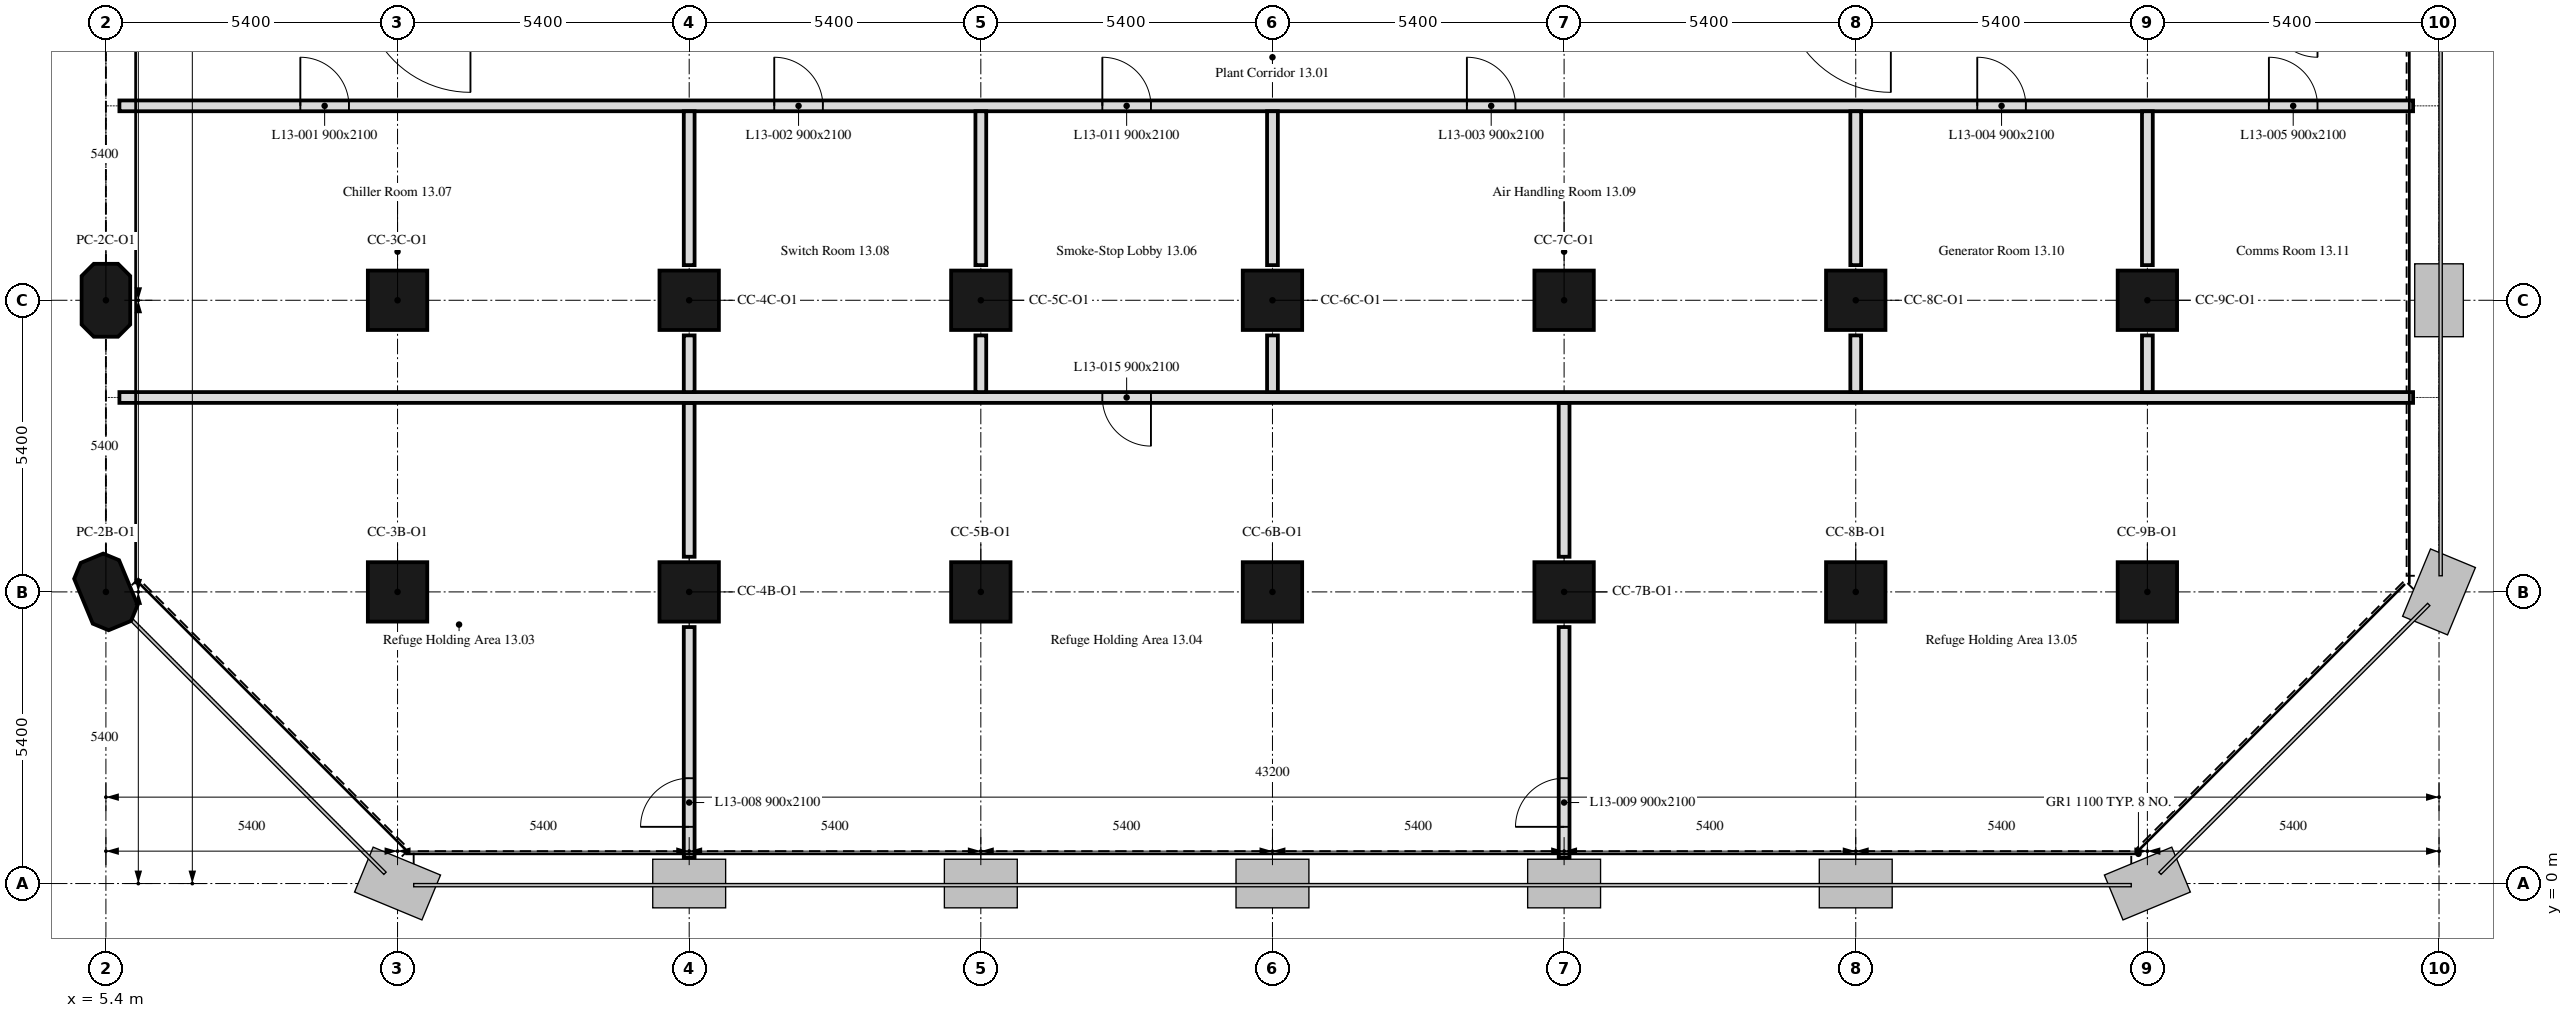
"""IFC4 building model, lengths in metres.
Left out: names, types, materials, properties, quantities, classifications, styles, units other than length and angle.
Written with IfcOpenShell. Run it as: python <this file> out.ifc"""

import sys

from ifc_helpers import new_model, si_unit, direction, frame, frame_2d, origin, origin_2d, place, context, subcontext, project, spatial, polyline, rectangle, outline, extrude, element, fill, save


model = new_model("IFC4")
c1 = context("Model", 3, precision=1e-05, world=origin(), true_north=direction((0.0, 1.0)))
c2 = subcontext(c1, "Body", "Model", "MODEL_VIEW")
j1 = project(units=[si_unit("LENGTHUNIT", "METRE"), si_unit("PLANEANGLEUNIT", "RADIAN")], contexts=[c1])
p1 = place(None, origin())
s1 = spatial("IfcSite", under=j1, at=p1, CompositionType="ELEMENT")
p2 = place(p1, origin())
s2 = spatial("IfcBuilding", under=s1, at=p2, CompositionType="ELEMENT")
p3 = place(p2, frame((0.0, 0.0, 60.2)))
s3 = spatial("IfcBuildingStorey", under=s2, at=p3, CompositionType="ELEMENT", Elevation=60.2)
p4 = place(p3, frame((5.4, 5.4, 0.0), z_axis=(0.0, 0.0, 1.0), x_axis=(-0.382683432365, 0.923879532511, 0.0)))
e1 = element("IfcColumn", 1, at=p4, inside=s3, PredefinedType="COLUMN", context=c2, shape_type="SweptSolid", body=[
    extrude(outline(polyline([(-0.45, -0.45), (0.45, -0.45), (0.675, -0.225), (0.675, 0.225), (0.45, 0.45), (-0.45, 0.45), (-0.675, 0.225), (-0.675, -0.225), (-0.45, -0.45)])), origin(), (0.0, 0.0, 1.0), 4.5),
])
for number, where, z_axis, x_axis in (
    (2, (10.8, 5.4, 0.0), (0.0, 0.0, 1.0), (1.0, 0.0, 0.0)),
    (3, (16.2, 5.4, 0.0), (0.0, 0.0, 1.0), (1.0, 0.0, 0.0)),
    (4, (21.6, 5.4, 0.0), (0.0, 0.0, 1.0), (1.0, 0.0, 0.0)),
    (5, (27.0, 5.4, 0.0), (0.0, 0.0, 1.0), (1.0, 0.0, 0.0)),
    (6, (32.4, 5.4, 0.0), (0.0, 0.0, 1.0), (1.0, 0.0, 0.0)),
    (7, (37.8, 5.4, 0.0), (0.0, 0.0, 1.0), (1.0, 0.0, 0.0)),
    (8, (43.2, 5.4, 0.0), (0.0, 0.0, 1.0), (1.0, 0.0, 0.0)),
):
    element("IfcColumn", number, at=place(p3, frame(where, z_axis=z_axis, x_axis=x_axis)), inside=s3, PredefinedType="COLUMN", context=c2, shape_type="SweptSolid", body=[
        extrude(rectangle(XDim=1.1, YDim=1.1, at=origin_2d()), origin(), (0.0, 0.0, 1.0), 4.5),
    ])
p5 = place(p3, frame((5.4, 10.8, 0.0), z_axis=(0.0, 0.0, 1.0), x_axis=(0.0, 1.0, 0.0)))
e9 = element("IfcColumn", 9, at=p5, inside=s3, PredefinedType="COLUMN", context=c2, shape_type="SweptSolid", body=[
    extrude(outline(polyline([(-0.45, -0.45), (0.45, -0.45), (0.675, -0.225), (0.675, 0.225), (0.45, 0.45), (-0.45, 0.45), (-0.675, 0.225), (-0.675, -0.225), (-0.45, -0.45)])), origin(), (0.0, 0.0, 1.0), 4.5),
])
for number, where, z_axis, x_axis in (
    (10, (10.8, 10.8, 0.0), (0.0, 0.0, 1.0), (1.0, 0.0, 0.0)),
    (11, (16.2, 10.8, 0.0), (0.0, 0.0, 1.0), (1.0, 0.0, 0.0)),
    (12, (21.6, 10.8, 0.0), (0.0, 0.0, 1.0), (1.0, 0.0, 0.0)),
    (13, (27.0, 10.8, 0.0), (0.0, 0.0, 1.0), (1.0, 0.0, 0.0)),
    (14, (32.4, 10.8, 0.0), (0.0, 0.0, 1.0), (1.0, 0.0, 0.0)),
    (15, (37.8, 10.8, 0.0), (0.0, 0.0, 1.0), (1.0, 0.0, 0.0)),
    (16, (43.2, 10.8, 0.0), (0.0, 0.0, 1.0), (1.0, 0.0, 0.0)),
):
    element("IfcColumn", number, at=place(p3, frame(where, z_axis=z_axis, x_axis=x_axis)), inside=s3, PredefinedType="COLUMN", context=c2, shape_type="SweptSolid", body=[
        extrude(rectangle(XDim=1.1, YDim=1.1, at=origin_2d()), origin(), (0.0, 0.0, 1.0), 4.5),
    ])
p6 = place(p3, frame((5.65, 14.4, 0.0), z_axis=(0.0, 0.0, 1.0), x_axis=(1.0, 0.0, 0.0)))
e17 = element("IfcWall", 17, at=p6, inside=s3, PredefinedType="PARTITIONING", context=c2, shape_type="SweptSolid", body=[
    extrude(rectangle(XDim=42.47, YDim=0.2, at=frame_2d((21.235, 0.0))), origin(), (0.0, 0.0, 1.0), 3.75),
])
p7 = place(p6, frame((3.35, 0.0, 0.0)))
e18 = element("IfcOpeningElement", 18, at=p7, cuts=e17, PredefinedType="OPENING", context=c2, shape_type="SweptSolid", body=[
    extrude(rectangle(XDim=0.9, YDim=2.1, at=frame_2d((0.45, 1.05))), frame((0.0, 0.1, 0.0), z_axis=(0.0, -1.0, 0.0), x_axis=(1.0, 0.0, 0.0)), (0.0, 0.0, 1.0), 0.2),
])
p8 = place(p6, frame((12.125, 0.0, 0.0)))
e19 = element("IfcOpeningElement", 19, at=p8, cuts=e17, PredefinedType="OPENING", context=c2, shape_type="SweptSolid", body=[
    extrude(rectangle(XDim=0.9, YDim=2.1, at=frame_2d((0.45, 1.05))), frame((0.0, 0.1, 0.0), z_axis=(0.0, -1.0, 0.0), x_axis=(1.0, 0.0, 0.0)), (0.0, 0.0, 1.0), 0.2),
])
p9 = place(p6, frame((24.95, 0.0, 0.0)))
e20 = element("IfcOpeningElement", 20, at=p9, cuts=e17, PredefinedType="OPENING", context=c2, shape_type="SweptSolid", body=[
    extrude(rectangle(XDim=0.9, YDim=2.1, at=frame_2d((0.45, 1.05))), frame((0.0, 0.1, 0.0), z_axis=(0.0, -1.0, 0.0), x_axis=(1.0, 0.0, 0.0)), (0.0, 0.0, 1.0), 0.2),
])
p10 = place(p6, frame((34.4, 0.0, 0.0)))
e21 = element("IfcOpeningElement", 21, at=p10, cuts=e17, PredefinedType="OPENING", context=c2, shape_type="SweptSolid", body=[
    extrude(rectangle(XDim=0.9, YDim=2.1, at=frame_2d((0.45, 1.05))), frame((0.0, 0.1, 0.0), z_axis=(0.0, -1.0, 0.0), x_axis=(1.0, 0.0, 0.0)), (0.0, 0.0, 1.0), 0.2),
])
p11 = place(p6, frame((39.8, 0.0, 0.0)))
e22 = element("IfcOpeningElement", 22, at=p11, cuts=e17, PredefinedType="OPENING", context=c2, shape_type="SweptSolid", body=[
    extrude(rectangle(XDim=0.9, YDim=2.1, at=frame_2d((0.45, 1.05))), frame((0.0, 0.1, 0.0), z_axis=(0.0, -1.0, 0.0), x_axis=(1.0, 0.0, 0.0)), (0.0, 0.0, 1.0), 0.2),
])
p12 = place(p6, frame((18.2, 0.0, 0.0)))
e23 = element("IfcOpeningElement", 23, at=p12, cuts=e17, PredefinedType="OPENING", context=c2, shape_type="SweptSolid", body=[
    extrude(rectangle(XDim=0.9, YDim=2.1, at=frame_2d((0.45, 1.05))), frame((0.0, 0.1, 0.0), z_axis=(0.0, -1.0, 0.0), x_axis=(1.0, 0.0, 0.0)), (0.0, 0.0, 1.0), 0.2),
])
p13 = place(p3, frame((16.2, 0.48, 0.0), z_axis=(0.0, 0.0, 1.0), x_axis=(0.0, 1.0, 0.0)))
e24 = element("IfcWall", 24, at=p13, inside=s3, PredefinedType="PARTITIONING", context=c2, shape_type="SweptSolid", body=[
    extrude(rectangle(XDim=4.269, YDim=0.2, at=frame_2d((2.135, 0.0))), origin(), (0.0, 0.0, 1.0), 3.75),
])
p14 = place(p13, frame((0.57, 0.0, 0.0)))
e25 = element("IfcOpeningElement", 25, at=p14, cuts=e24, PredefinedType="OPENING", context=c2, shape_type="SweptSolid", body=[
    extrude(rectangle(XDim=0.9, YDim=2.1, at=frame_2d((0.45, 1.05))), frame((0.0, 0.1, 0.0), z_axis=(0.0, -1.0, 0.0), x_axis=(1.0, 0.0, 0.0)), (0.0, 0.0, 1.0), 0.2),
])
p15 = place(p3, frame((16.2, 6.051, 0.0), z_axis=(0.0, 0.0, 1.0), x_axis=(0.0, 1.0, 0.0)))
e26 = element("IfcWall", 26, at=p15, inside=s3, PredefinedType="PARTITIONING", context=c2, shape_type="SweptSolid", body=[
    extrude(rectangle(XDim=2.849, YDim=0.2, at=frame_2d((1.425, 0.0))), origin(), (0.0, 0.0, 1.0), 3.75),
])
p16 = place(p3, frame((32.4, 0.48, 0.0), z_axis=(0.0, 0.0, 1.0), x_axis=(0.0, 1.0, 0.0)))
e27 = element("IfcWall", 27, at=p16, inside=s3, PredefinedType="PARTITIONING", context=c2, shape_type="SweptSolid", body=[
    extrude(rectangle(XDim=4.269, YDim=0.2, at=frame_2d((2.135, 0.0))), origin(), (0.0, 0.0, 1.0), 3.75),
])
p17 = place(p16, frame((0.57, 0.0, 0.0)))
e28 = element("IfcOpeningElement", 28, at=p17, cuts=e27, PredefinedType="OPENING", context=c2, shape_type="SweptSolid", body=[
    extrude(rectangle(XDim=0.9, YDim=2.1, at=frame_2d((0.45, 1.05))), frame((0.0, 0.1, 0.0), z_axis=(0.0, -1.0, 0.0), x_axis=(1.0, 0.0, 0.0)), (0.0, 0.0, 1.0), 0.2),
])
p18 = place(p3, frame((32.4, 6.051, 0.0), z_axis=(0.0, 0.0, 1.0), x_axis=(0.0, 1.0, 0.0)))
e29 = element("IfcWall", 29, at=p18, inside=s3, PredefinedType="PARTITIONING", context=c2, shape_type="SweptSolid", body=[
    extrude(rectangle(XDim=2.849, YDim=0.2, at=frame_2d((1.425, 0.0))), origin(), (0.0, 0.0, 1.0), 3.75),
])
p19 = place(p3, frame((48.12, 9.0, 0.0), z_axis=(0.0, 0.0, 1.0), x_axis=(-1.0, 0.0, 0.0)))
e30 = element("IfcWall", 30, at=p19, inside=s3, PredefinedType="PARTITIONING", context=c2, shape_type="SweptSolid", body=[
    extrude(rectangle(XDim=42.47, YDim=0.2, at=frame_2d((21.235, 0.0))), origin(), (0.0, 0.0, 1.0), 3.75),
])
p20 = place(p19, frame((23.37, 0.0, 0.0)))
e31 = element("IfcOpeningElement", 31, at=p20, cuts=e30, PredefinedType="OPENING", context=c2, shape_type="SweptSolid", body=[
    extrude(rectangle(XDim=0.9, YDim=2.1, at=frame_2d((0.45, 1.05))), frame((0.0, 0.1, 0.0), z_axis=(0.0, -1.0, 0.0), x_axis=(1.0, 0.0, 0.0)), (0.0, 0.0, 1.0), 0.2),
])
p21 = place(p3, frame((16.2, 9.1, 0.0), z_axis=(0.0, 0.0, 1.0), x_axis=(0.0, 1.0, 0.0)))
e32 = element("IfcWall", 32, at=p21, inside=s3, PredefinedType="PARTITIONING", context=c2, shape_type="SweptSolid", body=[
    extrude(rectangle(XDim=1.049, YDim=0.2, at=frame_2d((0.525, 0.0))), origin(), (0.0, 0.0, 1.0), 3.75),
])
p22 = place(p3, frame((16.2, 11.451, 0.0), z_axis=(0.0, 0.0, 1.0), x_axis=(0.0, 1.0, 0.0)))
e33 = element("IfcWall", 33, at=p22, inside=s3, PredefinedType="PARTITIONING", context=c2, shape_type="SweptSolid", body=[
    extrude(rectangle(XDim=2.849, YDim=0.2, at=frame_2d((1.425, 0.0))), origin(), (0.0, 0.0, 1.0), 3.75),
])
p23 = place(p3, frame((21.6, 9.1, 0.0), z_axis=(0.0, 0.0, 1.0), x_axis=(0.0, 1.0, 0.0)))
e34 = element("IfcWall", 34, at=p23, inside=s3, PredefinedType="PARTITIONING", context=c2, shape_type="SweptSolid", body=[
    extrude(rectangle(XDim=1.049, YDim=0.2, at=frame_2d((0.525, 0.0))), origin(), (0.0, 0.0, 1.0), 3.75),
])
p24 = place(p3, frame((21.6, 11.451, 0.0), z_axis=(0.0, 0.0, 1.0), x_axis=(0.0, 1.0, 0.0)))
e35 = element("IfcWall", 35, at=p24, inside=s3, PredefinedType="PARTITIONING", context=c2, shape_type="SweptSolid", body=[
    extrude(rectangle(XDim=2.849, YDim=0.2, at=frame_2d((1.425, 0.0))), origin(), (0.0, 0.0, 1.0), 3.75),
])
p25 = place(p3, frame((37.8, 9.1, 0.0), z_axis=(0.0, 0.0, 1.0), x_axis=(0.0, 1.0, 0.0)))
e36 = element("IfcWall", 36, at=p25, inside=s3, PredefinedType="PARTITIONING", context=c2, shape_type="SweptSolid", body=[
    extrude(rectangle(XDim=1.049, YDim=0.2, at=frame_2d((0.525, 0.0))), origin(), (0.0, 0.0, 1.0), 3.75),
])
for number, where, z_axis, x_axis in (
    (37, (37.8, 11.451, 0.0), (0.0, 0.0, 1.0), (0.0, 1.0, 0.0)),
    (38, (27.0, 14.3, 0.0), (0.0, 0.0, 1.0), (0.0, -1.0, 0.0)),
):
    element("IfcWall", number, at=place(p3, frame(where, z_axis=z_axis, x_axis=x_axis)), inside=s3, PredefinedType="PARTITIONING", context=c2, shape_type="SweptSolid", body=[
        extrude(rectangle(XDim=2.849, YDim=0.2, at=frame_2d((1.425, 0.0))), origin(), (0.0, 0.0, 1.0), 3.75),
    ])
p26 = place(p3, frame((27.0, 10.149, 0.0), z_axis=(0.0, 0.0, 1.0), x_axis=(0.0, -1.0, 0.0)))
e39 = element("IfcWall", 39, at=p26, inside=s3, PredefinedType="PARTITIONING", context=c2, shape_type="SweptSolid", body=[
    extrude(rectangle(XDim=1.049, YDim=0.2, at=frame_2d((0.525, 0.0))), origin(), (0.0, 0.0, 1.0), 3.75),
])
p27 = place(p3, frame((43.2, 9.1, 0.0), z_axis=(0.0, 0.0, 1.0), x_axis=(0.0, 1.0, 0.0)))
e40 = element("IfcWall", 40, at=p27, inside=s3, PredefinedType="PARTITIONING", context=c2, shape_type="SweptSolid", body=[
    extrude(rectangle(XDim=1.049, YDim=0.2, at=frame_2d((0.525, 0.0))), origin(), (0.0, 0.0, 1.0), 4.5),
])
p28 = place(p3, frame((43.2, 11.451, 0.0), z_axis=(0.0, 0.0, 1.0), x_axis=(0.0, 1.0, 0.0)))
e41 = element("IfcWall", 41, at=p28, inside=s3, PredefinedType="PARTITIONING", context=c2, shape_type="SweptSolid", body=[
    extrude(rectangle(XDim=2.849, YDim=0.2, at=frame_2d((1.425, 0.0))), origin(), (0.0, 0.0, 1.0), 4.5),
])
p29 = place(p7, origin())
e42 = element("IfcDoor", 42, at=p29, inside=s3, OperationType="SINGLE_SWING_LEFT", PredefinedType="DOOR", context=c2, shape_type="SweptSolid", body=[
    extrude(rectangle(XDim=0.9, YDim=2.1, at=frame_2d((0.45, 1.05))), frame((0.0, 0.025, 0.0), z_axis=(0.0, -1.0, 0.0), x_axis=(1.0, 0.0, 0.0)), (0.0, 0.0, 1.0), 0.05),
])
fill(e18, e42)
p30 = place(p8, origin())
e43 = element("IfcDoor", 43, at=p30, inside=s3, OperationType="SINGLE_SWING_LEFT", PredefinedType="DOOR", context=c2, shape_type="SweptSolid", body=[
    extrude(rectangle(XDim=0.9, YDim=2.1, at=frame_2d((0.45, 1.05))), frame((0.0, 0.025, 0.0), z_axis=(0.0, -1.0, 0.0), x_axis=(1.0, 0.0, 0.0)), (0.0, 0.0, 1.0), 0.05),
])
fill(e19, e43)
p31 = place(p9, origin())
e44 = element("IfcDoor", 44, at=p31, inside=s3, OperationType="SINGLE_SWING_LEFT", PredefinedType="DOOR", context=c2, shape_type="SweptSolid", body=[
    extrude(rectangle(XDim=0.9, YDim=2.1, at=frame_2d((0.45, 1.05))), frame((0.0, 0.025, 0.0), z_axis=(0.0, -1.0, 0.0), x_axis=(1.0, 0.0, 0.0)), (0.0, 0.0, 1.0), 0.05),
])
fill(e20, e44)
p32 = place(p10, origin())
e45 = element("IfcDoor", 45, at=p32, inside=s3, OperationType="SINGLE_SWING_RIGHT", PredefinedType="DOOR", context=c2, shape_type="SweptSolid", body=[
    extrude(rectangle(XDim=0.9, YDim=2.1, at=frame_2d((0.45, 1.05))), frame((0.0, 0.025, 0.0), z_axis=(0.0, -1.0, 0.0), x_axis=(1.0, 0.0, 0.0)), (0.0, 0.0, 1.0), 0.05),
])
fill(e21, e45)
p33 = place(p11, origin())
e46 = element("IfcDoor", 46, at=p33, inside=s3, OperationType="SINGLE_SWING_RIGHT", PredefinedType="DOOR", context=c2, shape_type="SweptSolid", body=[
    extrude(rectangle(XDim=0.9, YDim=2.1, at=frame_2d((0.45, 1.05))), frame((0.0, 0.025, 0.0), z_axis=(0.0, -1.0, 0.0), x_axis=(1.0, 0.0, 0.0)), (0.0, 0.0, 1.0), 0.05),
])
fill(e22, e46)
p34 = place(p14, origin())
e47 = element("IfcDoor", 47, at=p34, inside=s3, OperationType="SINGLE_SWING_LEFT", PredefinedType="DOOR", context=c2, shape_type="SweptSolid", body=[
    extrude(rectangle(XDim=0.9, YDim=2.1, at=frame_2d((0.45, 1.05))), frame((0.0, 0.025, 0.0), z_axis=(0.0, -1.0, 0.0), x_axis=(1.0, 0.0, 0.0)), (0.0, 0.0, 1.0), 0.05),
])
fill(e25, e47)
p35 = place(p17, origin())
e48 = element("IfcDoor", 48, at=p35, inside=s3, OperationType="SINGLE_SWING_RIGHT", PredefinedType="DOOR", context=c2, shape_type="SweptSolid", body=[
    extrude(rectangle(XDim=0.9, YDim=2.1, at=frame_2d((0.45, 1.05))), frame((0.0, 0.025, 0.0), z_axis=(0.0, -1.0, 0.0), x_axis=(1.0, 0.0, 0.0)), (0.0, 0.0, 1.0), 0.05),
])
fill(e28, e48)
p36 = place(p12, origin())
e49 = element("IfcDoor", 49, at=p36, inside=s3, OperationType="SINGLE_SWING_RIGHT", PredefinedType="DOOR", context=c2, shape_type="SweptSolid", body=[
    extrude(rectangle(XDim=0.9, YDim=2.1, at=frame_2d((0.45, 1.05))), frame((0.0, 0.025, 0.0), z_axis=(0.0, -1.0, 0.0), x_axis=(1.0, 0.0, 0.0)), (0.0, 0.0, 1.0), 0.05),
])
fill(e23, e49)
p37 = place(p20, origin())
e50 = element("IfcDoor", 50, at=p37, inside=s3, OperationType="SINGLE_SWING_RIGHT", PredefinedType="DOOR", context=c2, shape_type="SweptSolid", body=[
    extrude(rectangle(XDim=0.9, YDim=2.1, at=frame_2d((0.45, 1.05))), frame((0.0, 0.025, 0.0), z_axis=(0.0, -1.0, 0.0), x_axis=(1.0, 0.0, 0.0)), (0.0, 0.0, 1.0), 0.05),
])
fill(e31, e50)
save(model, sys.argv[1])
